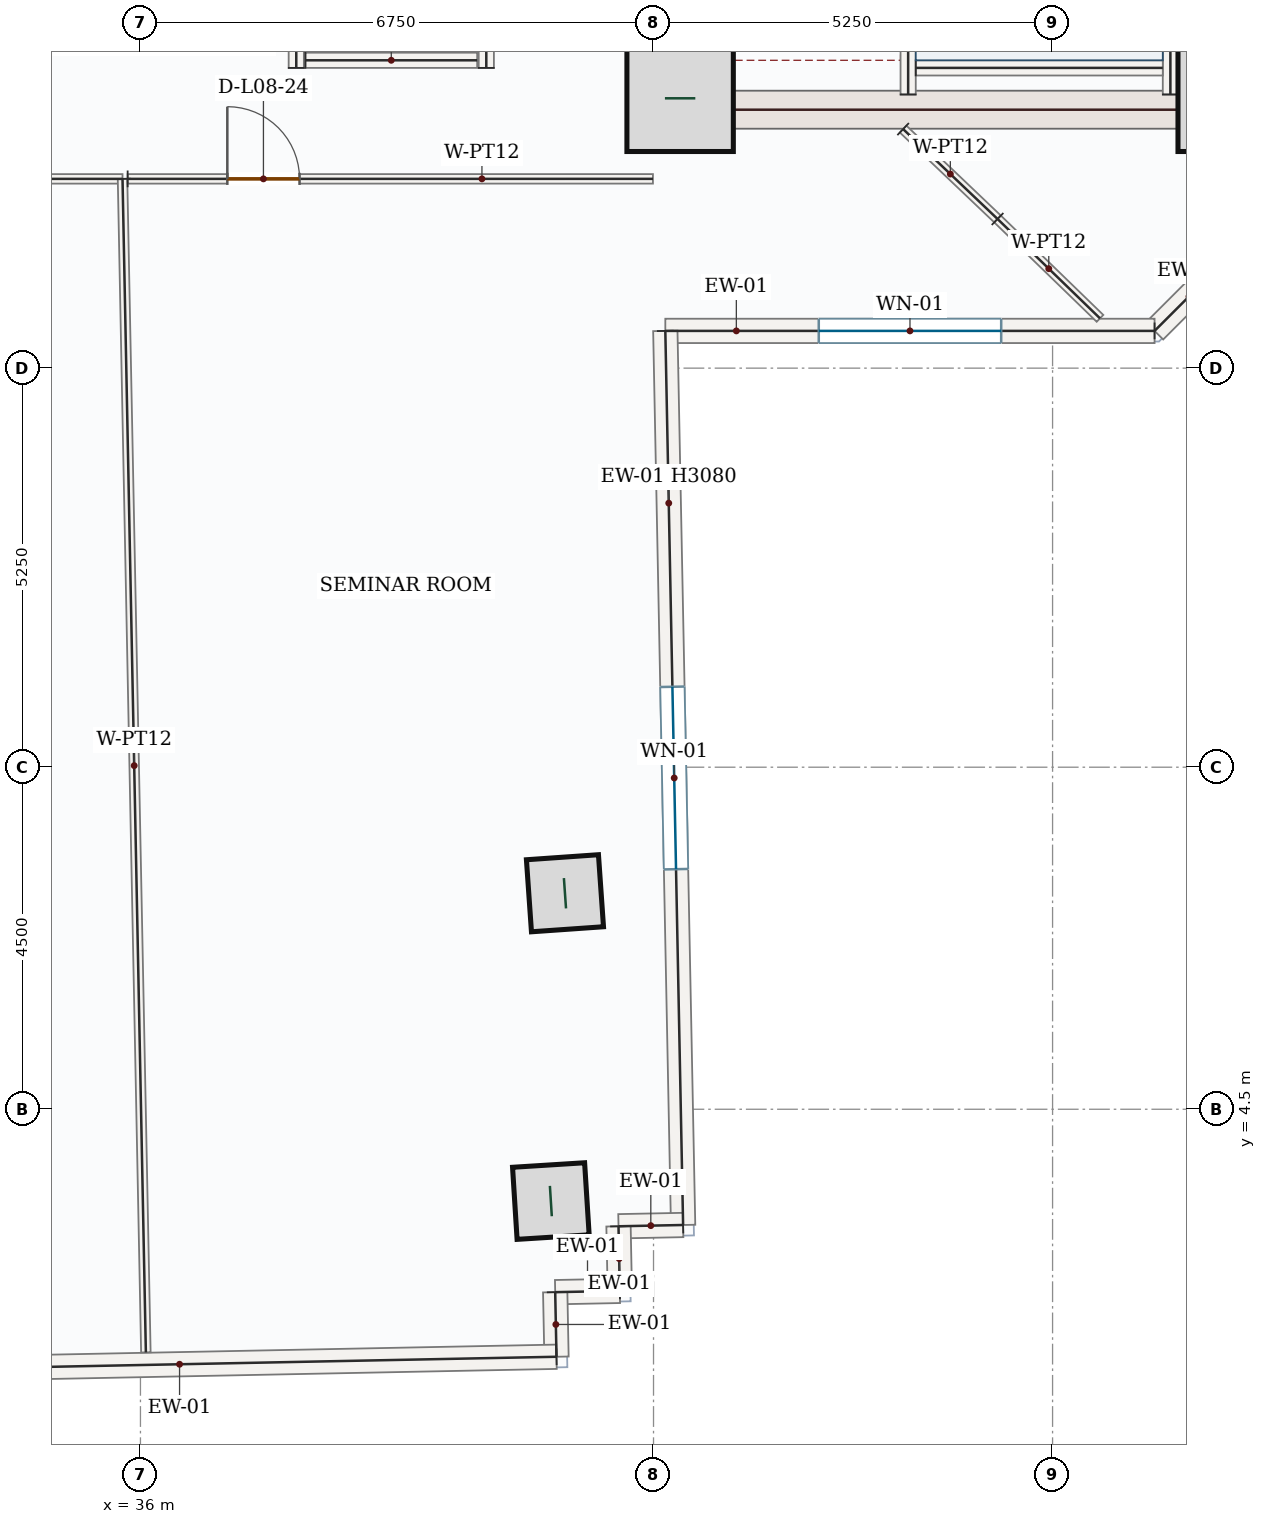
"""IFC4 building model, lengths in metres.
Left out: names, types, materials, properties, quantities, classifications, styles, units other than length and angle.
Written with IfcOpenShell. Run it as: python <this file> out.ifc"""

import sys

from ifc_helpers import new_model, si_unit, direction, frame, frame_2d, origin, origin_2d, place, context, subcontext, project, spatial, rectangle, hollow_rectangle, extrude, source, transform, mapped, element, fill, save


model = new_model("IFC4")
c1 = context("Model", 3, precision=1e-05, world=origin(), true_north=direction((0.0, 1.0)))
c2 = subcontext(c1, "Body", "Model", "MODEL_VIEW")
j1 = project(units=[si_unit("LENGTHUNIT", "METRE"), si_unit("PLANEANGLEUNIT", "RADIAN")], contexts=[c1])
p1 = place(None, origin())
s1 = spatial("IfcSite", under=j1, at=p1, CompositionType="ELEMENT")
p2 = place(p1, origin())
s2 = spatial("IfcBuilding", under=s1, at=p2, CompositionType="ELEMENT")
p3 = place(p2, frame((0.0, 0.0, 41.7)))
s3 = spatial("IfcBuildingStorey", under=s2, at=p3, CompositionType="ELEMENT", Elevation=41.7)
p4 = place(p3, frame((43.0, 17.4, 0.0), z_axis=(0.0, 0.0, 1.0), x_axis=(0.0, 1.0, 0.0)))
e1 = element("IfcWall", 1, at=p4, inside=s3, PredefinedType="SHEAR", context=c2, shape_type="SweptSolid", body=[
    extrude(rectangle(XDim=8.55, YDim=0.5, at=frame_2d((4.275, 0.0))), origin(), (0.0, 0.0, 1.0), 3.95),
])
p5 = place(p4, frame((6.65, 0.0, 0.0)))
e2 = element("IfcOpeningElement", 2, at=p5, cuts=e1, PredefinedType="OPENING", context=c2, shape_type="SweptSolid", body=[
    extrude(rectangle(XDim=1.1, YDim=2.2, at=frame_2d((0.55, 1.1))), frame((0.0, 0.26, 0.0), z_axis=(0.0, -1.0, 0.0), x_axis=(1.0, 0.0, 0.0)), (0.0, 0.0, 1.0), 0.52),
])
p6 = place(p4, frame((1.75, 0.0, 0.0)))
e3 = element("IfcOpeningElement", 3, at=p6, cuts=e1, PredefinedType="OPENING", context=c2, shape_type="SweptSolid", body=[
    extrude(rectangle(XDim=1.3, YDim=2.2, at=frame_2d((0.65, 1.1))), frame((0.0, 0.26, 0.0), z_axis=(0.0, -1.0, 0.0), x_axis=(1.0, 0.0, 0.0)), (0.0, 0.0, 1.0), 0.52),
])
p7 = place(p4, frame((4.55, 0.0, 0.0)))
e4 = element("IfcOpeningElement", 4, at=p7, cuts=e1, PredefinedType="OPENING", context=c2, shape_type="SweptSolid", body=[
    extrude(rectangle(XDim=0.88, YDim=2.1, at=frame_2d((0.44, 1.05))), frame((0.0, 0.26, 0.0), z_axis=(0.0, -1.0, 0.0), x_axis=(1.0, 0.0, 0.0)), (0.0, 0.0, 1.0), 0.52),
])
m1 = source(origin(), c2, "Body", "SweptSolid", [
    extrude(rectangle(XDim=7.0, YDim=0.5, at=frame_2d((3.5, 0.0))), origin(), (0.0, 0.0, 1.0), 3.95),
])
p8 = place(p3, frame((43.25, 17.65, 0.0), z_axis=(0.0, 0.0, 1.0), x_axis=(1.0, 0.0, 0.0)))
e5 = element("IfcWall", 5, at=p8, inside=s3, PredefinedType="SHEAR", context=c2, shape_type="MappedRepresentation", body=[
    mapped(m1, transform((0.0, 0.0, 0.0), x_axis=(1.0, 0.0, 0.0), y_axis=(0.0, 1.0, 0.0), z_axis=(0.0, 0.0, 1.0), scale=1.0)),
])
m2 = source(origin(), c2, "Body", "SweptSolid", [
    extrude(rectangle(XDim=1.4, YDim=1.4, at=origin_2d()), origin(), (0.0, 0.0, 1.0), 4.2),
])
for number, where, z_axis, x_axis in (
    (6, (43.1, 17.8, 0.0), (0.0, 0.0, 1.0), (1.0, 0.0, 0.0)),
    (7, (50.35, 17.8, 0.0), (0.0, 0.0, 1.0), (1.0, 0.0, 0.0)),
):
    element("IfcColumn", number, at=place(p3, frame(where, z_axis=z_axis, x_axis=x_axis)), inside=s3, PredefinedType="COLUMN", context=c2, shape_type="MappedRepresentation", body=[
        mapped(m2, transform((0.0, 0.0, 0.0), x_axis=(1.0, 0.0, 0.0), y_axis=(0.0, 1.0, 0.0), z_axis=(0.0, 0.0, 1.0), scale=1.0)),
    ])
m3 = source(origin(), c2, "Body", "SweptSolid", [
    extrude(hollow_rectangle(XDim=0.95, YDim=0.95, WallThickness=0.05, at=origin_2d()), origin(), (0.0, 0.0, 1.0), 4.2),
])
for number, where, z_axis, x_axis in (
    (8, (41.585, 7.342, 0.0), (0.0, 0.0, 1.0), (-0.07, 0.998, 0.0)),
    (9, (41.399, 3.292, 0.0), (0.0, 0.0, 1.0), (-0.063, 0.998, 0.0)),
):
    element("IfcColumn", number, at=place(p3, frame(where, z_axis=z_axis, x_axis=x_axis)), inside=s3, PredefinedType="COLUMN", context=c2, shape_type="MappedRepresentation", body=[
        mapped(m3, transform((0.0, 0.0, 0.0), x_axis=(1.0, 0.0, 0.0), y_axis=(0.0, 1.0, 0.0), z_axis=(0.0, 0.0, 1.0), scale=1.0)),
    ])
p9 = place(p3, frame((53.06, 18.458, 0.0), z_axis=(0.0, 0.0, 1.0), x_axis=(-0.707106781187, -0.707106781187, 0.0)))
e10 = element("IfcWall", 10, at=p9, inside=s3, PredefinedType="SOLIDWALL", context=c2, shape_type="SweptSolid", body=[
    extrude(rectangle(XDim=5.258, YDim=0.32, at=frame_2d((2.629, 0.0))), origin(), (0.0, 0.0, 1.0), 3.95),
])
p10 = place(p9, frame((1.429, 0.0, 0.85)))
e11 = element("IfcOpeningElement", 11, at=p10, cuts=e10, PredefinedType="OPENING", context=c2, shape_type="SweptSolid", body=[
    extrude(rectangle(XDim=2.4, YDim=1.8, at=frame_2d((1.2, 0.9))), frame((0.0, 0.17, 0.0), z_axis=(0.0, -1.0, 0.0), x_axis=(1.0, 0.0, 0.0)), (0.0, 0.0, 1.0), 0.34),
])
p11 = place(p3, frame((49.342, 14.74, 0.0), z_axis=(0.0, 0.0, 1.0), x_axis=(-1.0, 0.0, 0.0)))
e12 = element("IfcWall", 12, at=p11, inside=s3, PredefinedType="SOLIDWALL", context=c2, shape_type="SweptSolid", body=[
    extrude(rectangle(XDim=6.437, YDim=0.32, at=frame_2d((3.218, 0.0))), origin(), (0.0, 0.0, 1.0), 3.95),
])
p12 = place(p11, frame((2.018, 0.0, 0.85)))
e13 = element("IfcOpeningElement", 13, at=p12, cuts=e12, PredefinedType="OPENING", context=c2, shape_type="SweptSolid", body=[
    extrude(rectangle(XDim=2.4, YDim=1.8, at=frame_2d((1.2, 0.9))), frame((0.0, 0.17, 0.0), z_axis=(0.0, -1.0, 0.0), x_axis=(1.0, 0.0, 0.0)), (0.0, 0.0, 1.0), 0.34),
])
p13 = place(p3, frame((42.905, 14.74, 0.0), z_axis=(0.0, 0.0, 1.0), x_axis=(0.019900582882, -0.999801963791, 0.0)))
e14 = element("IfcWall", 14, at=p13, inside=s3, PredefinedType="SOLIDWALL", context=c2, shape_type="SweptSolid", body=[
    extrude(rectangle(XDim=11.765, YDim=0.32, at=frame_2d((5.883, 0.0))), origin(), (0.0, 0.0, 1.0), 3.08),
])
p14 = place(p13, frame((4.683, 0.0, 0.85)))
e15 = element("IfcOpeningElement", 15, at=p14, cuts=e14, PredefinedType="OPENING", context=c2, shape_type="SweptSolid", body=[
    extrude(rectangle(XDim=2.4, YDim=1.8, at=frame_2d((1.2, 0.9))), frame((0.0, 0.17, 0.0), z_axis=(0.0, -1.0, 0.0), x_axis=(1.0, 0.0, 0.0)), (0.0, 0.0, 1.0), 0.34),
])
m4 = source(origin(), c2, "Body", "SweptSolid", [
    extrude(rectangle(XDim=0.85, YDim=0.32, at=frame_2d((0.425, 0.0))), origin(), (0.0, 0.0, 1.0), 3.95),
])
for number, where, z_axis, x_axis in (
    (16, (43.139, 2.977, 0.0), (0.0, 0.0, 1.0), (-1.0, -0.02, 0.0)),
    (17, (42.29, 2.96, 0.0), (0.0, 0.0, 1.0), (0.02, -1.0, 0.0)),
    (18, (42.306, 2.111, 0.0), (0.0, 0.0, 1.0), (-1.0, -0.02, 0.0)),
):
    element("IfcWall", number, at=place(p3, frame(where, z_axis=z_axis, x_axis=x_axis)), inside=s3, PredefinedType="SOLIDWALL", context=c2, shape_type="MappedRepresentation", body=[
        mapped(m4, transform((0.0, 0.0, 0.0), x_axis=(1.0, 0.0, 0.0), y_axis=(0.0, 1.0, 0.0), z_axis=(0.0, 0.0, 1.0), scale=1.0)),
    ])
m5 = source(origin(), c2, "Body", "SweptSolid", [
    extrude(rectangle(XDim=0.85, YDim=0.32, at=frame_2d((0.425, 0.0))), origin(), (0.0, 0.0, 1.0), 3.95),
])
p15 = place(p3, frame((41.457, 2.094, 0.0), z_axis=(0.0, 0.0, 1.0), x_axis=(0.019823689915, -0.999803491351, 0.0)))
e19 = element("IfcWall", 19, at=p15, inside=s3, PredefinedType="SOLIDWALL", context=c2, shape_type="MappedRepresentation", body=[
    mapped(m5, transform((0.0, 0.0, 0.0), x_axis=(1.0, 0.0, 0.0), y_axis=(0.0, 1.0, 0.0), z_axis=(0.0, 0.0, 1.0), scale=1.0)),
])
m6 = source(origin(), c2, "Body", "SweptSolid", [
    extrude(rectangle(XDim=9.92, YDim=0.32, at=frame_2d((4.96, 0.0))), origin(), (0.0, 0.0, 1.0), 3.95),
])
p16 = place(p3, frame((41.473, 1.244, 0.0), z_axis=(0.0, 0.0, 1.0), x_axis=(-0.999801768563, -0.019910388705, 0.0)))
e20 = element("IfcWall", 20, at=p16, inside=s3, PredefinedType="SOLIDWALL", context=c2, shape_type="MappedRepresentation", body=[
    mapped(m6, transform((0.0, 0.0, 0.0), x_axis=(1.0, 0.0, 0.0), y_axis=(0.0, 1.0, 0.0), z_axis=(0.0, 0.0, 1.0), scale=1.0)),
])
m7 = source(origin(), c2, "Body", "SweptSolid", [
    extrude(rectangle(XDim=7.87, YDim=0.2, at=frame_2d((3.935, 0.0))), origin(), (0.0, 0.0, 1.0), 3.95),
])
p17 = place(p3, frame((49.55, 17.85, 0.0), z_axis=(0.0, 0.0, 1.0), x_axis=(0.0, 1.0, 0.0)))
e21 = element("IfcWall", 21, at=p17, inside=s3, PredefinedType="SOLIDWALL", context=c2, shape_type="MappedRepresentation", body=[
    mapped(m7, transform((0.0, 0.0, 0.0), x_axis=(1.0, 0.0, 0.0), y_axis=(0.0, 1.0, 0.0), z_axis=(0.0, 0.0, 1.0), scale=1.0)),
])
p18 = place(p3, frame((46.1, 17.85, 0.0), z_axis=(0.0, 0.0, 1.0), x_axis=(0.0, 1.0, 0.0)))
e22 = element("IfcWall", 22, at=p18, inside=s3, PredefinedType="SOLIDWALL", context=c2, shape_type="SweptSolid", body=[
    extrude(rectangle(XDim=8.0, YDim=0.2, at=frame_2d((4.0, 0.0))), origin(), (0.0, 0.0, 1.0), 3.95),
])
p19 = place(p18, frame((6.3, 0.0, 0.0)))
e23 = element("IfcOpeningElement", 23, at=p19, cuts=e22, PredefinedType="OPENING", context=c2, shape_type="SweptSolid", body=[
    extrude(rectangle(XDim=1.05, YDim=2.15, at=frame_2d((0.525, 1.075))), frame((0.0, 0.11, 0.0), z_axis=(0.0, -1.0, 0.0), x_axis=(1.0, 0.0, 0.0)), (0.0, 0.0, 1.0), 0.22),
])
m8 = source(origin(), c2, "Body", "SweptSolid", [
    extrude(rectangle(XDim=3.25, YDim=0.2, at=frame_2d((1.625, 0.0))), origin(), (0.0, 0.0, 1.0), 3.95),
])
p20 = place(p3, frame((46.2, 18.2, 0.0), z_axis=(0.0, 0.0, 1.0), x_axis=(1.0, 0.0, 0.0)))
e24 = element("IfcWall", 24, at=p20, inside=s3, PredefinedType="SOLIDWALL", context=c2, shape_type="MappedRepresentation", body=[
    mapped(m8, transform((0.0, 0.0, 0.0), x_axis=(1.0, 0.0, 0.0), y_axis=(0.0, 1.0, 0.0), z_axis=(0.0, 0.0, 1.0), scale=1.0)),
])
m9 = source(origin(), c2, "Body", "SweptSolid", [
    extrude(rectangle(XDim=2.35, YDim=0.2, at=frame_2d((1.175, 0.0))), origin(), (0.0, 0.0, 1.0), 3.95),
])
for number, where, z_axis, x_axis in (
    (25, (38.05, 18.2, 0.0), (0.0, 0.0, 1.0), (0.0, 1.0, 0.0)),
    (26, (40.55, 18.2, 0.0), (0.0, 0.0, 1.0), (0.0, 1.0, 0.0)),
):
    element("IfcWall", number, at=place(p3, frame(where, z_axis=z_axis, x_axis=x_axis)), inside=s3, PredefinedType="SOLIDWALL", context=c2, shape_type="MappedRepresentation", body=[
        mapped(m9, transform((0.0, 0.0, 0.0), x_axis=(1.0, 0.0, 0.0), y_axis=(0.0, 1.0, 0.0), z_axis=(0.0, 0.0, 1.0), scale=1.0)),
    ])
m10 = source(origin(), c2, "Body", "SweptSolid", [
    extrude(rectangle(XDim=2.26, YDim=0.2, at=frame_2d((1.13, 0.0))), origin(), (0.0, 0.0, 1.0), 3.95),
])
p21 = place(p3, frame((38.17, 18.3, 0.0), z_axis=(0.0, 0.0, 1.0), x_axis=(1.0, 0.0, 0.0)))
e27 = element("IfcWall", 27, at=p21, inside=s3, PredefinedType="SOLIDWALL", context=c2, shape_type="MappedRepresentation", body=[
    mapped(m10, transform((0.0, 0.0, 0.0), x_axis=(1.0, 0.0, 0.0), y_axis=(0.0, 1.0, 0.0), z_axis=(0.0, 0.0, 1.0), scale=1.0)),
])
p22 = place(p3, frame((29.258, 16.74, 0.0), z_axis=(0.0, 0.0, 1.0), x_axis=(0.999999999296, -3.7522044e-05, 0.0)))
e28 = element("IfcWall", 28, at=p22, inside=s3, PredefinedType="PARTITIONING", context=c2, shape_type="SweptSolid", body=[
    extrude(rectangle(XDim=6.507, YDim=0.125, at=frame_2d((3.253, 0.0))), origin(), (0.0, 0.0, 1.0), 3.95),
])
p23 = place(p22, frame((4.334, 0.0, 0.0)))
e29 = element("IfcOpeningElement", 29, at=p23, cuts=e28, PredefinedType="OPENING", context=c2, shape_type="SweptSolid", body=[
    extrude(rectangle(XDim=0.95, YDim=2.15, at=frame_2d((0.475, 1.075))), frame((0.0, 0.073, 0.0), z_axis=(0.0, -1.0, 0.0), x_axis=(1.0, 0.0, 0.0)), (0.0, 0.0, 1.0), 0.145),
])
m11 = source(origin(), c2, "Body", "SweptSolid", [
    extrude(rectangle(XDim=15.442, YDim=0.125, at=frame_2d((7.721, 0.0))), origin(), (0.0, 0.0, 1.0), 3.95),
])
p24 = place(p3, frame((35.764, 16.74, 0.0), z_axis=(0.0, 0.0, 1.0), x_axis=(0.01988979601, -0.999802178441, 0.0)))
e30 = element("IfcWall", 30, at=p24, inside=s3, PredefinedType="PARTITIONING", context=c2, shape_type="MappedRepresentation", body=[
    mapped(m11, transform((0.0, 0.0, 0.0), x_axis=(1.0, 0.0, 0.0), y_axis=(0.0, 1.0, 0.0), z_axis=(0.0, 0.0, 1.0), scale=1.0)),
])
p25 = place(p3, frame((35.832, 16.74, 0.0), z_axis=(0.0, 0.0, 1.0), x_axis=(0.999999999376, 3.5326951e-05, 0.0)))
e31 = element("IfcWall", 31, at=p25, inside=s3, PredefinedType="PARTITIONING", context=c2, shape_type="SweptSolid", body=[
    extrude(rectangle(XDim=6.911, YDim=0.125, at=frame_2d((3.456, 0.0))), origin(), (0.0, 0.0, 1.0), 3.95),
])
p26 = place(p25, frame((1.311, 0.0, 0.0)))
e32 = element("IfcOpeningElement", 32, at=p26, cuts=e31, PredefinedType="OPENING", context=c2, shape_type="SweptSolid", body=[
    extrude(rectangle(XDim=0.95, YDim=2.15, at=frame_2d((0.475, 1.075))), frame((0.0, 0.073, 0.0), z_axis=(0.0, -1.0, 0.0), x_axis=(1.0, 0.0, 0.0)), (0.0, 0.0, 1.0), 0.145),
])
m12 = source(origin(), c2, "Body", "SweptSolid", [
    extrude(rectangle(XDim=1.715, YDim=0.125, at=frame_2d((0.857, 0.0))), origin(), (0.0, 0.0, 1.0), 3.95),
])
p27 = place(p3, frame((46.034, 17.395, 0.0), z_axis=(0.0, 0.0, 1.0), x_axis=(0.724259786069, -0.689527201989, 0.0)))
e33 = element("IfcWall", 33, at=p27, inside=s3, PredefinedType="PARTITIONING", context=c2, shape_type="MappedRepresentation", body=[
    mapped(m12, transform((0.0, 0.0, 0.0), x_axis=(1.0, 0.0, 0.0), y_axis=(0.0, 1.0, 0.0), z_axis=(0.0, 0.0, 1.0), scale=1.0)),
])
m13 = source(origin(), c2, "Body", "SweptSolid", [
    extrude(rectangle(XDim=1.878, YDim=0.125, at=frame_2d((0.939, 0.0))), origin(), (0.0, 0.0, 1.0), 3.95),
])
p28 = place(p3, frame((47.276, 16.212, 0.0), z_axis=(0.0, 0.0, 1.0), x_axis=(0.717752688518, -0.696298124459, 0.0)))
e34 = element("IfcWall", 34, at=p28, inside=s3, PredefinedType="PARTITIONING", context=c2, shape_type="MappedRepresentation", body=[
    mapped(m13, transform((0.0, 0.0, 0.0), x_axis=(1.0, 0.0, 0.0), y_axis=(0.0, 1.0, 0.0), z_axis=(0.0, 0.0, 1.0), scale=1.0)),
])
m14 = source(origin(), c2, "Body", "SweptSolid", [
    extrude(rectangle(XDim=2.4, YDim=1.8, at=frame_2d((1.2, 0.9))), frame((0.0, 0.03, 0.0), z_axis=(0.0, -1.0, 0.0), x_axis=(1.0, 0.0, 0.0)), (0.0, 0.0, 1.0), 0.06),
])
p29 = place(p12, origin())
e35 = element("IfcWindow", 35, at=p29, inside=s3, PartitioningType="DOUBLE_PANEL_VERTICAL", PredefinedType="WINDOW", context=c2, shape_type="MappedRepresentation", body=[
    mapped(m14, transform((0.0, 0.0, 0.0), x_axis=(1.0, 0.0, 0.0), y_axis=(0.0, 1.0, 0.0), z_axis=(0.0, 0.0, 1.0), scale=1.0)),
])
fill(e13, e35)
p30 = place(p14, origin())
e36 = element("IfcWindow", 36, at=p30, inside=s3, PartitioningType="DOUBLE_PANEL_VERTICAL", PredefinedType="WINDOW", context=c2, shape_type="MappedRepresentation", body=[
    mapped(m14, transform((0.0, 0.0, 0.0), x_axis=(1.0, 0.0, 0.0), y_axis=(0.0, 1.0, 0.0), z_axis=(0.0, 0.0, 1.0), scale=1.0)),
])
fill(e15, e36)
m15 = source(origin(), c2, "Body", "SweptSolid", [
    extrude(rectangle(XDim=0.95, YDim=2.15, at=frame_2d((0.475, 1.075))), frame((0.0, 0.025, 0.0), z_axis=(0.0, -1.0, 0.0), x_axis=(1.0, 0.0, 0.0)), (0.0, 0.0, 1.0), 0.05),
])
p31 = place(p26, origin())
e37 = element("IfcDoor", 37, at=p31, inside=s3, OperationType="SINGLE_SWING_LEFT", PredefinedType="DOOR", context=c2, shape_type="MappedRepresentation", body=[
    mapped(m15, transform((0.0, 0.0, 0.0), x_axis=(1.0, 0.0, 0.0), y_axis=(0.0, 1.0, 0.0), z_axis=(0.0, 0.0, 1.0), scale=1.0)),
])
fill(e32, e37)
save(model, sys.argv[1])
